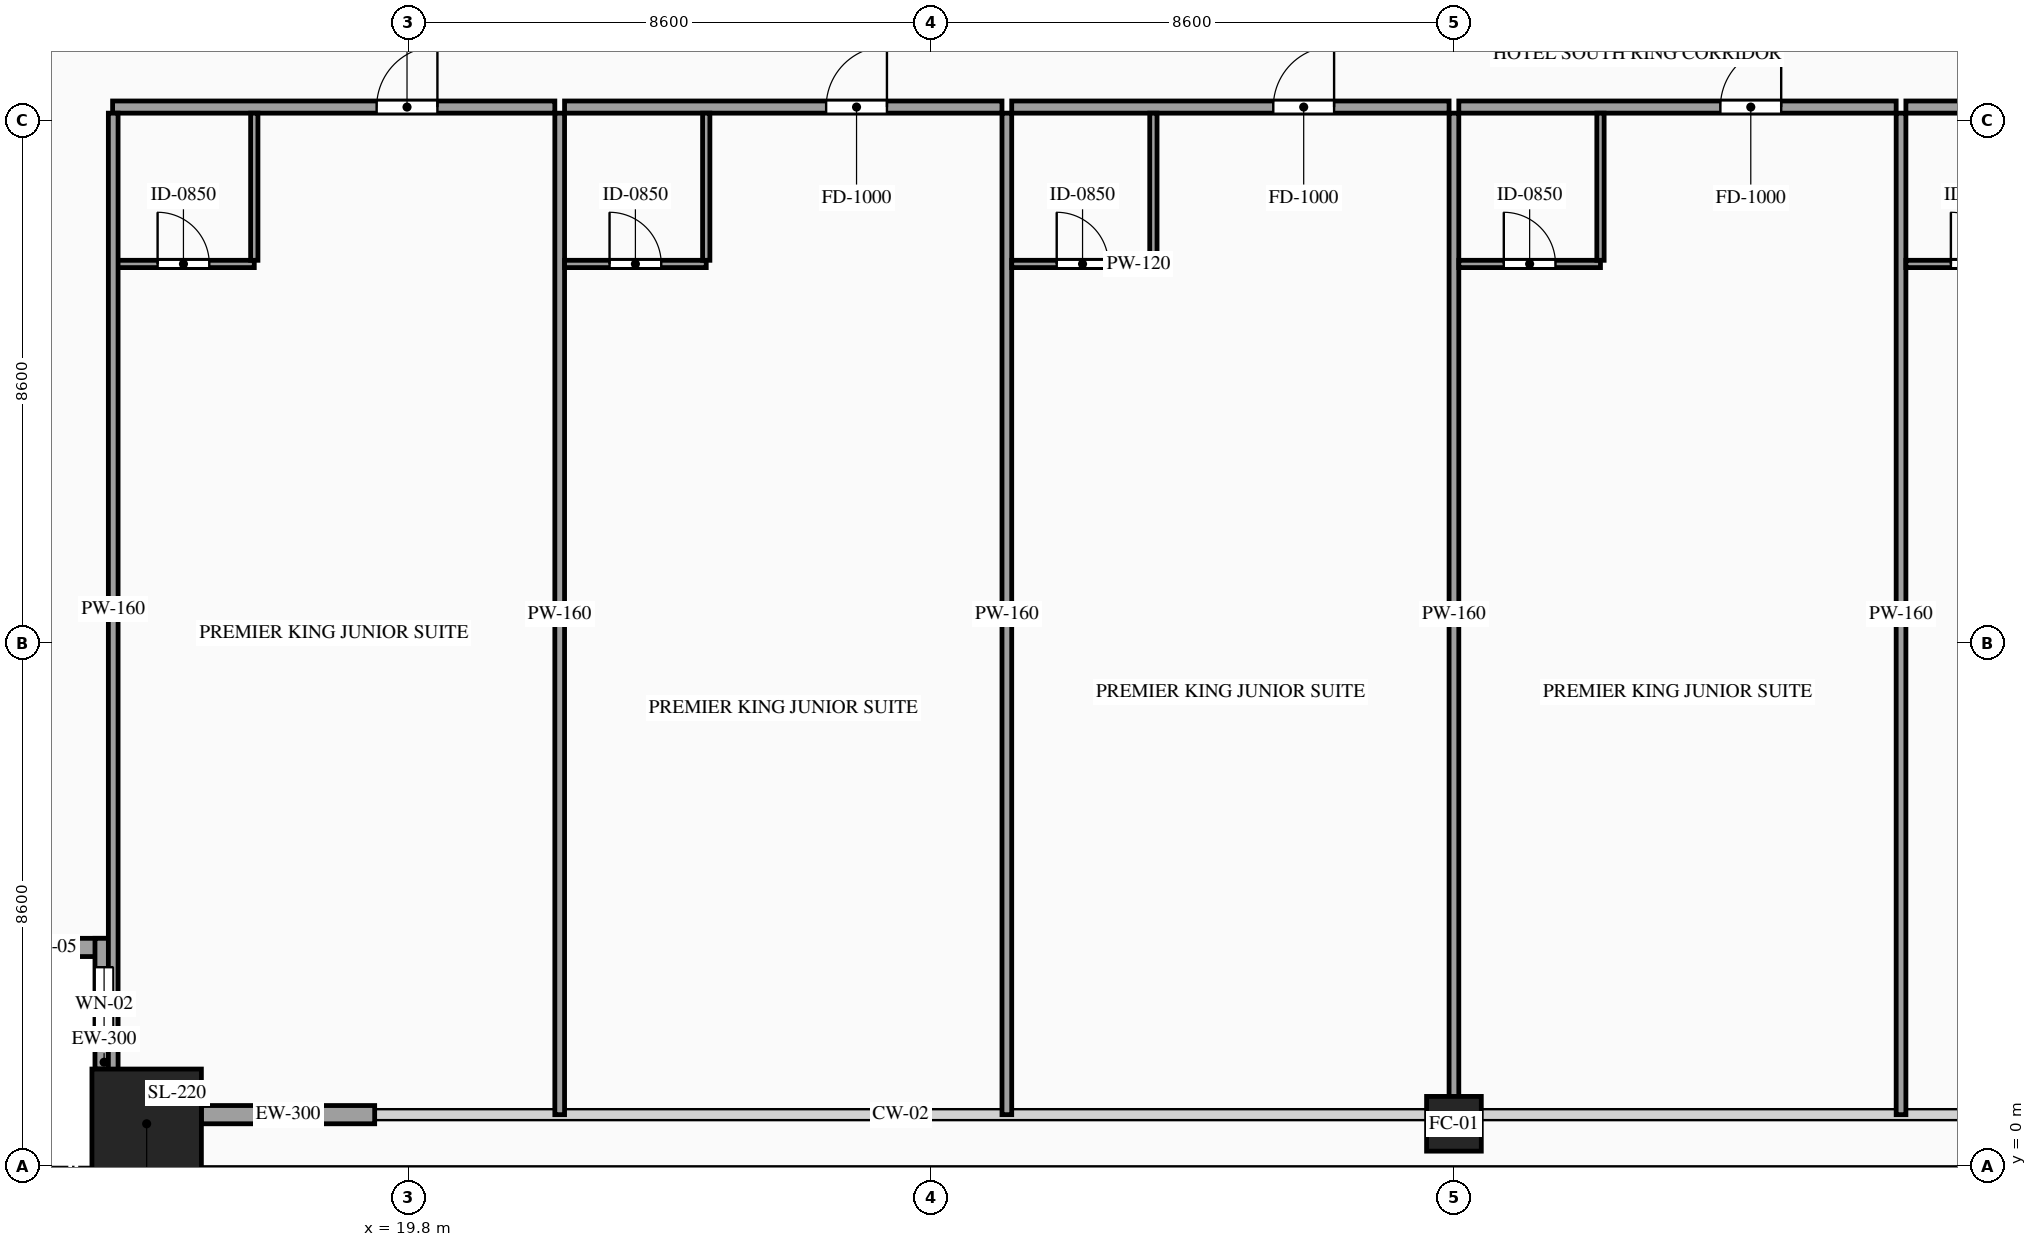
"""IFC4 building model, lengths in metres.
Left out: names, types, materials, properties, quantities, classifications, styles, units other than length and angle.
Written with IfcOpenShell. Run it as: python <this file> out.ifc"""

import sys

from ifc_helpers import new_model, si_unit, direction, frame, frame_2d, origin, origin_2d, place, context, subcontext, project, spatial, rectangle, hollow_rectangle, extrude, source, transform, mapped, element, fill, save


model = new_model("IFC4")
c1 = context("Model", 3, precision=1e-05, world=origin(), true_north=direction((0.0, 1.0)))
c2 = subcontext(c1, "Body", "Model", "MODEL_VIEW")
j1 = project(units=[si_unit("LENGTHUNIT", "METRE"), si_unit("PLANEANGLEUNIT", "RADIAN")], contexts=[c1])
p1 = place(None, origin())
s1 = spatial("IfcSite", under=j1, at=p1, CompositionType="ELEMENT")
p2 = place(p1, origin())
s2 = spatial("IfcBuilding", under=s1, at=p2, CompositionType="ELEMENT")
p3 = place(p2, frame((0.0, 0.0, 37.8)))
s3 = spatial("IfcBuildingStorey", under=s2, at=p3, CompositionType="ELEMENT", Elevation=37.8)
m1 = source(origin(), c2, "Body", "SweptSolid", [
    extrude(hollow_rectangle(XDim=1.8, YDim=1.8, WallThickness=0.08, at=origin_2d()), origin(), (0.0, 0.0, 1.0), 3.6),
])
p4 = place(p3, frame((15.5, 0.7, 0.0), z_axis=(0.0, 0.0, 1.0), x_axis=(1.0, 0.0, 0.0)))
e1 = element("IfcColumn", 1, at=p4, inside=s3, PredefinedType="COLUMN", context=c2, shape_type="MappedRepresentation", body=[
    mapped(m1, transform((0.0, 0.0, 0.0), scale=1.0)),
])
m2 = source(origin(), c2, "Body", "SweptSolid", [
    extrude(hollow_rectangle(XDim=0.9, YDim=0.9, WallThickness=0.042, at=origin_2d()), origin(), (0.0, 0.0, 1.0), 3.6),
])
p5 = place(p3, frame((37.0, 0.7, 0.0), z_axis=(0.0, 0.0, 1.0), x_axis=(1.0, 0.0, 0.0)))
e2 = element("IfcColumn", 2, at=p5, inside=s3, PredefinedType="COLUMN", context=c2, shape_type="MappedRepresentation", body=[
    mapped(m2, transform((0.0, 0.0, 0.0), scale=1.0)),
])
p6 = place(p3, frame((12.8, 3.6, 0.0), z_axis=(0.0, 0.0, 1.0), x_axis=(1.0, 0.0, 0.0)))
e3 = element("IfcWall", 3, at=p6, inside=s3, PredefinedType="SOLIDWALL", context=c2, shape_type="SweptSolid", body=[
    extrude(rectangle(XDim=2.15, YDim=0.3, at=frame_2d((1.075, 0.0))), origin(), (0.0, 0.0, 1.0), 3.32),
])
p7 = place(p6, frame((0.625, 0.0, 0.85)))
e4 = element("IfcOpeningElement", 4, at=p7, cuts=e3, PredefinedType="OPENING", context=c2, shape_type="SweptSolid", body=[
    extrude(rectangle(XDim=0.9, YDim=1.5, at=frame_2d((0.45, 0.75))), frame((0.0, 0.165, 0.0), z_axis=(0.0, -1.0, 0.0), x_axis=(1.0, 0.0, 0.0)), (0.0, 0.0, 1.0), 0.33),
])
p8 = place(p3, frame((14.8, 3.75, 0.0), z_axis=(0.0, 0.0, 1.0), x_axis=(0.0, -1.0, 0.0)))
e5 = element("IfcWall", 5, at=p8, inside=s3, PredefinedType="SOLIDWALL", context=c2, shape_type="SweptSolid", body=[
    extrude(rectangle(XDim=2.15, YDim=0.3, at=frame_2d((1.075, 0.0))), origin(), (0.0, 0.0, 1.0), 3.32),
])
p9 = place(p8, frame((0.475, 0.0, 0.85)))
e6 = element("IfcOpeningElement", 6, at=p9, cuts=e5, PredefinedType="OPENING", context=c2, shape_type="SweptSolid", body=[
    extrude(rectangle(XDim=1.2, YDim=2.1, at=frame_2d((0.6, 1.05))), frame((0.0, 0.165, 0.0), z_axis=(0.0, -1.0, 0.0), x_axis=(1.0, 0.0, 0.0)), (0.0, 0.0, 1.0), 0.33),
])
m3 = source(origin(), c2, "Body", "SweptSolid", [
    extrude(rectangle(XDim=2.85, YDim=0.3, at=frame_2d((1.425, 0.0))), origin(), (0.0, 0.0, 1.0), 2.715),
])
p10 = place(p3, frame((16.4, 0.85, 0.0), z_axis=(0.0, 0.0, 1.0), x_axis=(1.0, 0.0, 0.0)))
e7 = element("IfcWall", 7, at=p10, inside=s3, PredefinedType="SOLIDWALL", context=c2, shape_type="MappedRepresentation", body=[
    mapped(m3, transform((0.0, 0.0, 0.0), scale=1.0)),
])
p11 = place(p3, frame((14.94, 17.42, 0.0), z_axis=(0.0, 0.0, 1.0), x_axis=(1.0, 0.0, 0.0)))
e8 = element("IfcWall", 8, at=p11, inside=s3, PredefinedType="PARTITIONING", context=c2, shape_type="SweptSolid", body=[
    extrude(rectangle(XDim=7.273, YDim=0.2, at=frame_2d((3.636, 0.0))), origin(), (0.0, 0.0, 1.0), 3.32),
])
p12 = place(p11, frame((4.342, 0.0, 0.0)))
e9 = element("IfcOpeningElement", 9, at=p12, cuts=e8, PredefinedType="OPENING", context=c2, shape_type="SweptSolid", body=[
    extrude(rectangle(XDim=1.0, YDim=2.2, at=frame_2d((0.5, 1.1))), frame((0.0, 0.115, 0.0), z_axis=(0.0, -1.0, 0.0), x_axis=(1.0, 0.0, 0.0)), (0.0, 0.0, 1.0), 0.23),
])
m4 = source(origin(), c2, "Body", "SweptSolid", [
    extrude(rectangle(XDim=16.47, YDim=0.16, at=frame_2d((8.235, 0.0))), origin(), (0.0, 0.0, 1.0), 3.32),
])
p13 = place(p3, frame((22.293, 0.85, 0.0), z_axis=(0.0, 0.0, 1.0), x_axis=(0.0, 1.0, 0.0)))
e10 = element("IfcWall", 10, at=p13, inside=s3, PredefinedType="PARTITIONING", context=c2, shape_type="MappedRepresentation", body=[
    mapped(m4, transform((0.0, 0.0, 0.0), scale=1.0)),
])
p14 = place(p3, frame((14.94, 14.84, 0.0), z_axis=(0.0, 0.0, 1.0), x_axis=(1.0, 0.0, 0.0)))
e11 = element("IfcWall", 11, at=p14, inside=s3, PredefinedType="PARTITIONING", context=c2, shape_type="SweptSolid", body=[
    extrude(rectangle(XDim=2.33, YDim=0.12, at=frame_2d((1.165, 0.0))), origin(), (0.0, 0.0, 1.0), 3.32),
])
p15 = place(p14, frame((0.74, 0.0, 0.0)))
e12 = element("IfcOpeningElement", 12, at=p15, cuts=e11, PredefinedType="OPENING", context=c2, shape_type="SweptSolid", body=[
    extrude(rectangle(XDim=0.85, YDim=2.1, at=frame_2d((0.425, 1.05))), frame((0.0, 0.075, 0.0), z_axis=(0.0, -1.0, 0.0), x_axis=(1.0, 0.0, 0.0)), (0.0, 0.0, 1.0), 0.15),
])
m5 = source(origin(), c2, "Body", "SweptSolid", [
    extrude(rectangle(XDim=2.42, YDim=0.12, at=frame_2d((1.21, 0.0))), origin(), (0.0, 0.0, 1.0), 3.32),
])
p16 = place(p3, frame((17.27, 14.9, 0.0), z_axis=(0.0, 0.0, 1.0), x_axis=(0.0, 1.0, 0.0)))
e13 = element("IfcWall", 13, at=p16, inside=s3, PredefinedType="PARTITIONING", context=c2, shape_type="MappedRepresentation", body=[
    mapped(m5, transform((0.0, 0.0, 0.0), scale=1.0)),
])
p17 = place(p3, frame((22.373, 17.42, 0.0), z_axis=(0.0, 0.0, 1.0), x_axis=(1.0, 0.0, 0.0)))
e14 = element("IfcWall", 14, at=p17, inside=s3, PredefinedType="PARTITIONING", context=c2, shape_type="SweptSolid", body=[
    extrude(rectangle(XDim=7.194, YDim=0.2, at=frame_2d((3.597, 0.0))), origin(), (0.0, 0.0, 1.0), 3.32),
])
p18 = place(p17, frame((4.302, 0.0, 0.0)))
e15 = element("IfcOpeningElement", 15, at=p18, cuts=e14, PredefinedType="OPENING", context=c2, shape_type="SweptSolid", body=[
    extrude(rectangle(XDim=1.0, YDim=2.2, at=frame_2d((0.5, 1.1))), frame((0.0, 0.115, 0.0), z_axis=(0.0, -1.0, 0.0), x_axis=(1.0, 0.0, 0.0)), (0.0, 0.0, 1.0), 0.23),
])
p19 = place(p3, frame((29.647, 0.85, 0.0), z_axis=(0.0, 0.0, 1.0), x_axis=(0.0, 1.0, 0.0)))
e16 = element("IfcWall", 16, at=p19, inside=s3, PredefinedType="PARTITIONING", context=c2, shape_type="MappedRepresentation", body=[
    mapped(m4, transform((0.0, 0.0, 0.0), scale=1.0)),
])
p20 = place(p3, frame((22.373, 14.84, 0.0), z_axis=(0.0, 0.0, 1.0), x_axis=(1.0, 0.0, 0.0)))
e17 = element("IfcWall", 17, at=p20, inside=s3, PredefinedType="PARTITIONING", context=c2, shape_type="SweptSolid", body=[
    extrude(rectangle(XDim=2.33, YDim=0.12, at=frame_2d((1.165, 0.0))), origin(), (0.0, 0.0, 1.0), 3.32),
])
p21 = place(p20, frame((0.74, 0.0, 0.0)))
e18 = element("IfcOpeningElement", 18, at=p21, cuts=e17, PredefinedType="OPENING", context=c2, shape_type="SweptSolid", body=[
    extrude(rectangle(XDim=0.85, YDim=2.1, at=frame_2d((0.425, 1.05))), frame((0.0, 0.075, 0.0), z_axis=(0.0, -1.0, 0.0), x_axis=(1.0, 0.0, 0.0)), (0.0, 0.0, 1.0), 0.15),
])
p22 = place(p3, frame((24.703, 14.9, 0.0), z_axis=(0.0, 0.0, 1.0), x_axis=(0.0, 1.0, 0.0)))
e19 = element("IfcWall", 19, at=p22, inside=s3, PredefinedType="PARTITIONING", context=c2, shape_type="MappedRepresentation", body=[
    mapped(m5, transform((0.0, 0.0, 0.0), scale=1.0)),
])
p23 = place(p3, frame((29.727, 17.42, 0.0), z_axis=(0.0, 0.0, 1.0), x_axis=(1.0, 0.0, 0.0)))
e20 = element("IfcWall", 20, at=p23, inside=s3, PredefinedType="PARTITIONING", context=c2, shape_type="SweptSolid", body=[
    extrude(rectangle(XDim=7.193, YDim=0.2, at=frame_2d((3.596, 0.0))), origin(), (0.0, 0.0, 1.0), 3.32),
])
p24 = place(p23, frame((4.302, 0.0, 0.0)))
e21 = element("IfcOpeningElement", 21, at=p24, cuts=e20, PredefinedType="OPENING", context=c2, shape_type="SweptSolid", body=[
    extrude(rectangle(XDim=1.0, YDim=2.2, at=frame_2d((0.5, 1.1))), frame((0.0, 0.115, 0.0), z_axis=(0.0, -1.0, 0.0), x_axis=(1.0, 0.0, 0.0)), (0.0, 0.0, 1.0), 0.23),
])
m6 = source(origin(), c2, "Body", "SweptSolid", [
    extrude(rectangle(XDim=16.47, YDim=0.16, at=frame_2d((8.235, 0.0))), origin(), (0.0, 0.0, 1.0), 2.515),
])
p25 = place(p3, frame((37.0, 0.85, 0.0), z_axis=(0.0, 0.0, 1.0), x_axis=(0.0, 1.0, 0.0)))
e22 = element("IfcWall", 22, at=p25, inside=s3, PredefinedType="PARTITIONING", context=c2, shape_type="MappedRepresentation", body=[
    mapped(m6, transform((0.0, 0.0, 0.0), scale=1.0)),
])
p26 = place(p3, frame((29.727, 14.84, 0.0), z_axis=(0.0, 0.0, 1.0), x_axis=(1.0, 0.0, 0.0)))
e23 = element("IfcWall", 23, at=p26, inside=s3, PredefinedType="PARTITIONING", context=c2, shape_type="SweptSolid", body=[
    extrude(rectangle(XDim=2.33, YDim=0.12, at=frame_2d((1.165, 0.0))), origin(), (0.0, 0.0, 1.0), 3.32),
])
p27 = place(p26, frame((0.74, 0.0, 0.0)))
e24 = element("IfcOpeningElement", 24, at=p27, cuts=e23, PredefinedType="OPENING", context=c2, shape_type="SweptSolid", body=[
    extrude(rectangle(XDim=0.85, YDim=2.1, at=frame_2d((0.425, 1.05))), frame((0.0, 0.075, 0.0), z_axis=(0.0, -1.0, 0.0), x_axis=(1.0, 0.0, 0.0)), (0.0, 0.0, 1.0), 0.15),
])
p28 = place(p3, frame((32.057, 14.9, 0.0), z_axis=(0.0, 0.0, 1.0), x_axis=(0.0, 1.0, 0.0)))
e25 = element("IfcWall", 25, at=p28, inside=s3, PredefinedType="PARTITIONING", context=c2, shape_type="MappedRepresentation", body=[
    mapped(m5, transform((0.0, 0.0, 0.0), scale=1.0)),
])
p29 = place(p3, frame((37.08, 17.42, 0.0), z_axis=(0.0, 0.0, 1.0), x_axis=(1.0, 0.0, 0.0)))
e26 = element("IfcWall", 26, at=p29, inside=s3, PredefinedType="PARTITIONING", context=c2, shape_type="SweptSolid", body=[
    extrude(rectangle(XDim=7.193, YDim=0.2, at=frame_2d((3.596, 0.0))), origin(), (0.0, 0.0, 1.0), 3.32),
])
p30 = place(p29, frame((4.302, 0.0, 0.0)))
e27 = element("IfcOpeningElement", 27, at=p30, cuts=e26, PredefinedType="OPENING", context=c2, shape_type="SweptSolid", body=[
    extrude(rectangle(XDim=1.0, YDim=2.2, at=frame_2d((0.5, 1.1))), frame((0.0, 0.115, 0.0), z_axis=(0.0, -1.0, 0.0), x_axis=(1.0, 0.0, 0.0)), (0.0, 0.0, 1.0), 0.23),
])
p31 = place(p3, frame((44.353, 0.85, 0.0), z_axis=(0.0, 0.0, 1.0), x_axis=(0.0, 1.0, 0.0)))
e28 = element("IfcWall", 28, at=p31, inside=s3, PredefinedType="PARTITIONING", context=c2, shape_type="MappedRepresentation", body=[
    mapped(m4, transform((0.0, 0.0, 0.0), scale=1.0)),
])
p32 = place(p3, frame((37.08, 14.84, 0.0), z_axis=(0.0, 0.0, 1.0), x_axis=(1.0, 0.0, 0.0)))
e29 = element("IfcWall", 29, at=p32, inside=s3, PredefinedType="PARTITIONING", context=c2, shape_type="SweptSolid", body=[
    extrude(rectangle(XDim=2.33, YDim=0.12, at=frame_2d((1.165, 0.0))), origin(), (0.0, 0.0, 1.0), 3.32),
])
p33 = place(p32, frame((0.74, 0.0, 0.0)))
e30 = element("IfcOpeningElement", 30, at=p33, cuts=e29, PredefinedType="OPENING", context=c2, shape_type="SweptSolid", body=[
    extrude(rectangle(XDim=0.85, YDim=2.1, at=frame_2d((0.425, 1.05))), frame((0.0, 0.075, 0.0), z_axis=(0.0, -1.0, 0.0), x_axis=(1.0, 0.0, 0.0)), (0.0, 0.0, 1.0), 0.15),
])
p34 = place(p3, frame((39.41, 14.9, 0.0), z_axis=(0.0, 0.0, 1.0), x_axis=(0.0, 1.0, 0.0)))
e31 = element("IfcWall", 31, at=p34, inside=s3, PredefinedType="PARTITIONING", context=c2, shape_type="MappedRepresentation", body=[
    mapped(m5, transform((0.0, 0.0, 0.0), scale=1.0)),
])
p35 = place(p3, frame((44.433, 17.42, 0.0), z_axis=(0.0, 0.0, 1.0), x_axis=(1.0, 0.0, 0.0)))
e32 = element("IfcWall", 32, at=p35, inside=s3, PredefinedType="PARTITIONING", context=c2, shape_type="SweptSolid", body=[
    extrude(rectangle(XDim=7.194, YDim=0.2, at=frame_2d((3.597, 0.0))), origin(), (0.0, 0.0, 1.0), 3.32),
])
p36 = place(p35, frame((4.302, 0.0, 0.0)))
e33 = element("IfcOpeningElement", 33, at=p36, cuts=e32, PredefinedType="OPENING", context=c2, shape_type="SweptSolid", body=[
    extrude(rectangle(XDim=1.0, YDim=2.2, at=frame_2d((0.5, 1.1))), frame((0.0, 0.115, 0.0), z_axis=(0.0, -1.0, 0.0), x_axis=(1.0, 0.0, 0.0)), (0.0, 0.0, 1.0), 0.23),
])
p37 = place(p3, frame((44.433, 14.84, 0.0), z_axis=(0.0, 0.0, 1.0), x_axis=(1.0, 0.0, 0.0)))
e34 = element("IfcWall", 34, at=p37, inside=s3, PredefinedType="PARTITIONING", context=c2, shape_type="SweptSolid", body=[
    extrude(rectangle(XDim=2.33, YDim=0.12, at=frame_2d((1.165, 0.0))), origin(), (0.0, 0.0, 1.0), 3.32),
])
p38 = place(p37, frame((0.74, 0.0, 0.0)))
e35 = element("IfcOpeningElement", 35, at=p38, cuts=e34, PredefinedType="OPENING", context=c2, shape_type="SweptSolid", body=[
    extrude(rectangle(XDim=0.85, YDim=2.1, at=frame_2d((0.425, 1.05))), frame((0.0, 0.075, 0.0), z_axis=(0.0, -1.0, 0.0), x_axis=(1.0, 0.0, 0.0)), (0.0, 0.0, 1.0), 0.15),
])
m7 = source(origin(), c2, "Body", "SweptSolid", [
    extrude(rectangle(XDim=16.32, YDim=0.16, at=frame_2d((8.16, 0.0))), origin(), (0.0, 0.0, 1.0), 3.32),
])
p39 = place(p3, frame((14.95, 1.0, 0.0), z_axis=(0.0, 0.0, 1.0), x_axis=(0.0, 1.0, 0.0)))
e36 = element("IfcWall", 36, at=p39, inside=s3, PredefinedType="PARTITIONING", context=c2, shape_type="MappedRepresentation", body=[
    mapped(m7, transform((0.0, 0.0, 0.0), scale=1.0)),
])
m8 = source(origin(), c2, "Body", "SweptSolid", [
    extrude(rectangle(XDim=0.9, YDim=1.5, at=frame_2d((0.45, 0.75))), frame((0.0, 0.03, 0.0), z_axis=(0.0, -1.0, 0.0), x_axis=(1.0, 0.0, 0.0)), (0.0, 0.0, 1.0), 0.06),
])
p40 = place(p7, origin())
e37 = element("IfcWindow", 37, at=p40, inside=s3, PartitioningType="SINGLE_PANEL", PredefinedType="WINDOW", context=c2, shape_type="MappedRepresentation", body=[
    mapped(m8, transform((0.0, 0.0, 0.0), scale=1.0)),
])
fill(e4, e37)
m9 = source(origin(), c2, "Body", "SweptSolid", [
    extrude(rectangle(XDim=1.2, YDim=2.1, at=frame_2d((0.6, 1.05))), frame((0.0, 0.03, 0.0), z_axis=(0.0, -1.0, 0.0), x_axis=(1.0, 0.0, 0.0)), (0.0, 0.0, 1.0), 0.06),
])
p41 = place(p9, origin())
e38 = element("IfcWindow", 38, at=p41, inside=s3, PartitioningType="SINGLE_PANEL", PredefinedType="WINDOW", context=c2, shape_type="MappedRepresentation", body=[
    mapped(m9, transform((0.0, 0.0, 0.0), scale=1.0)),
])
fill(e6, e38)
m10 = source(origin(), c2, "Body", "SweptSolid", [
    extrude(rectangle(XDim=1.0, YDim=2.2, at=frame_2d((0.5, 1.1))), frame((0.0, 0.025, 0.0), z_axis=(0.0, -1.0, 0.0), x_axis=(1.0, 0.0, 0.0)), (0.0, 0.0, 1.0), 0.05),
])
p42 = place(p12, origin())
e39 = element("IfcDoor", 39, at=p42, inside=s3, OperationType="SINGLE_SWING_RIGHT", PredefinedType="DOOR", context=c2, shape_type="MappedRepresentation", body=[
    mapped(m10, transform((0.0, 0.0, 0.0), scale=1.0)),
])
fill(e9, e39)
m11 = source(origin(), c2, "Body", "SweptSolid", [
    extrude(rectangle(XDim=0.85, YDim=2.1, at=frame_2d((0.425, 1.05))), frame((0.0, 0.025, 0.0), z_axis=(0.0, -1.0, 0.0), x_axis=(1.0, 0.0, 0.0)), (0.0, 0.0, 1.0), 0.05),
])
p43 = place(p15, origin())
e40 = element("IfcDoor", 40, at=p43, inside=s3, OperationType="SINGLE_SWING_LEFT", PredefinedType="DOOR", context=c2, shape_type="MappedRepresentation", body=[
    mapped(m11, transform((0.0, 0.0, 0.0), scale=1.0)),
])
fill(e12, e40)
p44 = place(p18, origin())
e41 = element("IfcDoor", 41, at=p44, inside=s3, OperationType="SINGLE_SWING_RIGHT", PredefinedType="DOOR", context=c2, shape_type="MappedRepresentation", body=[
    mapped(m10, transform((0.0, 0.0, 0.0), scale=1.0)),
])
fill(e15, e41)
p45 = place(p21, origin())
e42 = element("IfcDoor", 42, at=p45, inside=s3, OperationType="SINGLE_SWING_LEFT", PredefinedType="DOOR", context=c2, shape_type="MappedRepresentation", body=[
    mapped(m11, transform((0.0, 0.0, 0.0), scale=1.0)),
])
fill(e18, e42)
p46 = place(p24, origin())
e43 = element("IfcDoor", 43, at=p46, inside=s3, OperationType="SINGLE_SWING_RIGHT", PredefinedType="DOOR", context=c2, shape_type="MappedRepresentation", body=[
    mapped(m10, transform((0.0, 0.0, 0.0), scale=1.0)),
])
fill(e21, e43)
p47 = place(p27, origin())
e44 = element("IfcDoor", 44, at=p47, inside=s3, OperationType="SINGLE_SWING_LEFT", PredefinedType="DOOR", context=c2, shape_type="MappedRepresentation", body=[
    mapped(m11, transform((0.0, 0.0, 0.0), scale=1.0)),
])
fill(e24, e44)
p48 = place(p30, origin())
e45 = element("IfcDoor", 45, at=p48, inside=s3, OperationType="SINGLE_SWING_RIGHT", PredefinedType="DOOR", context=c2, shape_type="MappedRepresentation", body=[
    mapped(m10, transform((0.0, 0.0, 0.0), scale=1.0)),
])
fill(e27, e45)
p49 = place(p33, origin())
e46 = element("IfcDoor", 46, at=p49, inside=s3, OperationType="SINGLE_SWING_LEFT", PredefinedType="DOOR", context=c2, shape_type="MappedRepresentation", body=[
    mapped(m11, transform((0.0, 0.0, 0.0), scale=1.0)),
])
fill(e30, e46)
p50 = place(p38, origin())
e47 = element("IfcDoor", 47, at=p50, inside=s3, OperationType="SINGLE_SWING_LEFT", PredefinedType="DOOR", context=c2, shape_type="MappedRepresentation", body=[
    mapped(m11, transform((0.0, 0.0, 0.0), scale=1.0)),
])
fill(e35, e47)
save(model, sys.argv[1])
